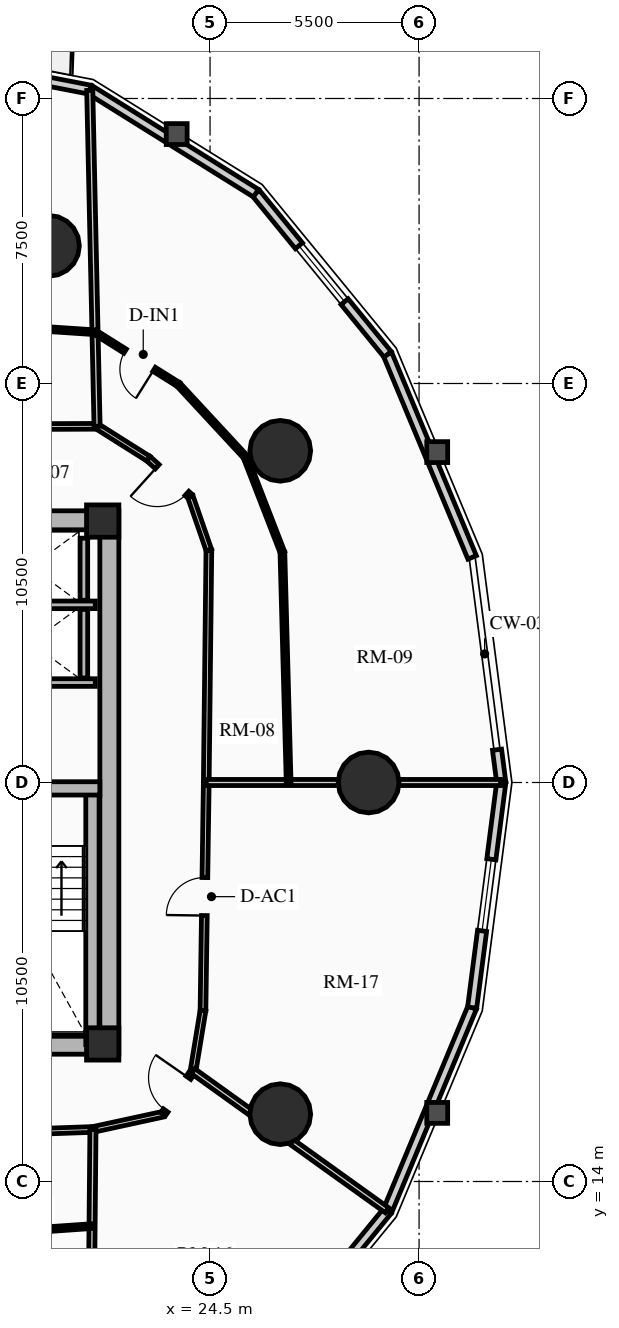
"""IFC4 building model, lengths in metres.
Left out: names, types, materials, properties, quantities, classifications, styles, units other than length and angle.
Written with IfcOpenShell. Run it as: python <this file> out.ifc"""

import sys

from ifc_helpers import new_model, si_unit, direction, frame, frame_2d, origin, origin_2d, place, context, subcontext, project, spatial, rectangle, circle, extrude, source, transform, mapped, element, fill, save


model = new_model("IFC4")
c1 = context("Model", 3, precision=1e-05, world=origin(), true_north=direction((0.0, 1.0)))
c2 = subcontext(c1, "Body", "Model", "MODEL_VIEW")
j1 = project(units=[si_unit("LENGTHUNIT", "METRE"), si_unit("PLANEANGLEUNIT", "RADIAN")], contexts=[c1])
p1 = place(None, origin())
s1 = spatial("IfcSite", under=j1, at=p1, CompositionType="ELEMENT")
p2 = place(p1, origin())
s2 = spatial("IfcBuilding", under=s1, at=p2, CompositionType="ELEMENT")
p3 = place(p2, frame((0.0, 0.0, 59.83)))
s3 = spatial("IfcBuildingStorey", under=s2, at=p3, CompositionType="ELEMENT", Elevation=59.83)
p4 = place(p3, frame((21.85, 17.35, 0.0), z_axis=(0.0, 0.0, 1.0), x_axis=(0.0, 1.0, 0.0)))
e1 = element("IfcWall", 1, at=p4, inside=s3, PredefinedType="SHEAR", context=c2, shape_type="SweptSolid", body=[
    extrude(rectangle(XDim=14.3, YDim=0.5, at=frame_2d((7.15, 0.0))), origin(), (0.0, 0.0, 1.0), 2.91),
])
p5 = place(p3, frame((11.15, 17.6, 0.0), z_axis=(0.0, 0.0, 1.0), x_axis=(1.0, 0.0, 0.0)))
e2 = element("IfcWall", 2, at=p5, inside=s3, PredefinedType="SHEAR", context=c2, shape_type="SweptSolid", body=[
    extrude(rectangle(XDim=10.7, YDim=0.5, at=frame_2d((5.35, 0.0))), origin(), (0.0, 0.0, 1.0), 2.91),
])
m1 = source(origin(), c2, "Body", "SweptSolid", [
    extrude(rectangle(XDim=1.5, YDim=2.02, at=frame_2d((0.75, 1.01))), frame((0.0, 0.26, 0.0), z_axis=(0.0, -1.0, 0.0), x_axis=(1.0, 0.0, 0.0)), (0.0, 0.0, 1.0), 0.52),
])
p6 = place(p5, frame((5.45, 0.0, 0.0)))
e3 = element("IfcOpeningElement", 3, at=p6, cuts=e2, PredefinedType="OPENING", context=c2, shape_type="MappedRepresentation", body=[
    mapped(m1, transform((0.0, 0.0, 0.0), x_axis=(1.0, 0.0, 0.0), y_axis=(0.0, 1.0, 0.0), z_axis=(0.0, 0.0, 1.0), scale=1.0)),
])
p7 = place(p3, frame((11.15, 31.4, 0.0), z_axis=(0.0, 0.0, 1.0), x_axis=(1.0, 0.0, 0.0)))
e4 = element("IfcWall", 4, at=p7, inside=s3, PredefinedType="SHEAR", context=c2, shape_type="SweptSolid", body=[
    extrude(rectangle(XDim=10.7, YDim=0.5, at=frame_2d((5.35, 0.0))), origin(), (0.0, 0.0, 1.0), 2.91),
])
p8 = place(p7, frame((4.6, 0.0, 0.0)))
e5 = element("IfcOpeningElement", 5, at=p8, cuts=e4, PredefinedType="OPENING", context=c2, shape_type="MappedRepresentation", body=[
    mapped(m1, transform((0.0, 0.0, 0.0), x_axis=(1.0, 0.0, 0.0), y_axis=(0.0, 1.0, 0.0), z_axis=(0.0, 0.0, 1.0), scale=1.0)),
])
p9 = place(p3, frame((21.405, 17.6, 0.0), z_axis=(0.0, 0.0, 1.0), x_axis=(0.0, 1.0, 0.0)))
e6 = element("IfcWall", 6, at=p9, inside=s3, PredefinedType="SHEAR", context=c2, shape_type="SweptSolid", body=[
    extrude(rectangle(XDim=6.745, YDim=0.35, at=frame_2d((3.373, 0.0))), origin(), (0.0, 0.0, 1.0), 2.91),
])
p10 = place(p3, frame((18.315, 24.345, 0.0), z_axis=(0.0, 0.0, 1.0), x_axis=(1.0, 0.0, 0.0)))
e7 = element("IfcWall", 7, at=p10, inside=s3, PredefinedType="SHEAR", context=c2, shape_type="SweptSolid", body=[
    extrude(rectangle(XDim=3.285, YDim=0.35, at=frame_2d((1.643, 0.0))), origin(), (0.0, 0.0, 1.0), 2.91),
])
for number, where, z_axis, x_axis in (
    (8, (21.675, 17.62, 0.0), (0.0, 0.0, 1.0), (1.0, 0.0, 0.0)),
    (9, (21.675, 31.38, 0.0), (0.0, 0.0, 1.0), (1.0, 0.0, 0.0)),
):
    element("IfcColumn", number, at=place(p3, frame(where, z_axis=z_axis, x_axis=x_axis)), inside=s3, PredefinedType="COLUMN", context=c2, shape_type="SweptSolid", body=[
        extrude(rectangle(XDim=0.85, YDim=0.85, at=origin_2d()), origin(), (0.0, 0.0, 1.0), 2.91),
    ])
for number, where, z_axis, x_axis in (
    (10, (28.672, 24.5, 0.0), (0.0, 0.0, 1.0), (1.0, 0.0, 0.0)),
    (11, (26.347, 33.229, 0.0), (0.0, 0.0, 1.0), (1.0, 0.0, 0.0)),
    (12, (20.261, 38.623, 0.0), (0.0, 0.0, 1.0), (1.0, 0.0, 0.0)),
    (13, (26.347, 15.771, 0.0), (0.0, 0.0, 1.0), (1.0, 0.0, 0.0)),
):
    element("IfcColumn", number, at=place(p3, frame(where, z_axis=z_axis, x_axis=x_axis)), inside=s3, PredefinedType="USERDEFINED", context=c2, shape_type="SweptSolid", body=[
        extrude(circle(Radius=0.8, at=origin_2d()), origin(), (0.0, 0.0, 1.0), 2.91),
    ])
p11 = place(p3, frame((32.051, 25.363, 0.0), z_axis=(0.0, 0.0, 1.0), x_axis=(0.128523364007, -0.991706481225, 0.0)))
e14 = element("IfcWall", 14, at=p11, inside=s3, PredefinedType="SOLIDWALL", context=c2, shape_type="SweptSolid", body=[
    extrude(rectangle(XDim=0.87, YDim=0.24, at=frame_2d((0.435, 0.0))), origin(), (0.0, 0.0, 1.0), 2.635),
])
p12 = place(p3, frame((29.172, 35.768, 0.0), z_axis=(0.0, 0.0, 1.0), x_axis=(0.384348836956, -0.923187939442, 0.0)))
e15 = element("IfcWall", 15, at=p12, inside=s3, PredefinedType="SOLIDWALL", context=c2, shape_type="SweptSolid", body=[
    extrude(rectangle(XDim=5.789, YDim=0.24, at=frame_2d((2.894, 0.0))), origin(), (0.0, 0.0, 1.0), 2.073),
])
p13 = place(p3, frame((25.707, 40.009, 0.0), z_axis=(0.0, 0.0, 1.0), x_axis=(0.632713287022, -0.77438614168, 0.0)))
e16 = element("IfcWall", 16, at=p13, inside=s3, PredefinedType="SOLIDWALL", context=c2, shape_type="SweptSolid", body=[
    extrude(rectangle(XDim=5.477, YDim=0.24, at=frame_2d((2.738, 0.0))), origin(), (0.0, 0.0, 1.0), 2.073),
])
m2 = source(origin(), c2, "Body", "SweptSolid", [
    extrude(rectangle(XDim=1.9, YDim=1.35, at=frame_2d((0.95, 0.675))), frame((0.0, 0.13, 0.0), z_axis=(0.0, -1.0, 0.0), x_axis=(1.0, 0.0, 0.0)), (0.0, 0.0, 1.0), 0.26),
])
p14 = place(p13, frame((1.788, 0.0, 0.65)))
e17 = element("IfcOpeningElement", 17, at=p14, cuts=e16, PredefinedType="OPENING", context=c2, shape_type="MappedRepresentation", body=[
    mapped(m2, transform((0.0, 0.0, 0.0), x_axis=(1.0, 0.0, 0.0), y_axis=(0.0, 1.0, 0.0), z_axis=(0.0, 0.0, 1.0), scale=1.0)),
])
p15 = place(p3, frame((21.34, 42.732, 0.0), z_axis=(0.0, 0.0, 1.0), x_axis=(0.848533613342, -0.529141481107, 0.0)))
e18 = element("IfcWall", 18, at=p15, inside=s3, PredefinedType="SOLIDWALL", context=c2, shape_type="SweptSolid", body=[
    extrude(rectangle(XDim=5.146, YDim=0.24, at=frame_2d((2.573, 0.0))), origin(), (0.0, 0.0, 1.0), 2.073),
])
p16 = place(p3, frame((16.5, 43.67, 0.0), z_axis=(0.0, 0.0, 1.0), x_axis=(0.981725274071, -0.190303668512, 0.0)))
e19 = element("IfcWall", 19, at=p16, inside=s3, PredefinedType="SOLIDWALL", context=c2, shape_type="SweptSolid", body=[
    extrude(rectangle(XDim=4.93, YDim=0.24, at=frame_2d((2.465, 0.0))), origin(), (0.0, 0.0, 1.0), 2.073),
])
m3 = source(origin(), c2, "Body", "SweptSolid", [
    extrude(rectangle(XDim=1.15, YDim=2.005, at=frame_2d((0.575, 1.002))), frame((0.0, 0.13, 0.0), z_axis=(0.0, -1.0, 0.0), x_axis=(1.0, 0.0, 0.0)), (0.0, 0.0, 1.0), 0.26),
])
p17 = place(p16, frame((1.89, 0.0, 0.0)))
e20 = element("IfcOpeningElement", 20, at=p17, cuts=e19, PredefinedType="OPENING", context=c2, shape_type="MappedRepresentation", body=[
    mapped(m3, transform((0.0, 0.0, 0.0), x_axis=(1.0, 0.0, 0.0), y_axis=(0.0, 1.0, 0.0), z_axis=(0.0, 0.0, 1.0), scale=1.0)),
])
p18 = place(p3, frame((29.172, 13.232, 0.0), z_axis=(0.0, 0.0, 1.0), x_axis=(-0.632713287022, -0.77438614168, 0.0)))
e21 = element("IfcWall", 21, at=p18, inside=s3, PredefinedType="SOLIDWALL", context=c2, shape_type="SweptSolid", body=[
    extrude(rectangle(XDim=5.477, YDim=0.24, at=frame_2d((2.738, 0.0))), origin(), (0.0, 0.0, 1.0), 2.073),
])
p19 = place(p18, frame((1.788, 0.0, 0.65)))
e22 = element("IfcOpeningElement", 22, at=p19, cuts=e21, PredefinedType="OPENING", context=c2, shape_type="MappedRepresentation", body=[
    mapped(m2, transform((0.0, 0.0, 0.0), x_axis=(1.0, 0.0, 0.0), y_axis=(0.0, 1.0, 0.0), z_axis=(0.0, 0.0, 1.0), scale=1.0)),
])
p20 = place(p3, frame((31.396, 18.576, 0.0), z_axis=(0.0, 0.0, 1.0), x_axis=(-0.384348836956, -0.923187939442, 0.0)))
e23 = element("IfcWall", 23, at=p20, inside=s3, PredefinedType="SOLIDWALL", context=c2, shape_type="SweptSolid", body=[
    extrude(rectangle(XDim=5.789, YDim=0.24, at=frame_2d((2.894, 0.0))), origin(), (0.0, 0.0, 1.0), 2.073),
])
p21 = place(p3, frame((32.163, 24.5, 0.0), z_axis=(0.0, 0.0, 1.0), x_axis=(-0.128339641463, -0.991730274031, 0.0)))
e24 = element("IfcWall", 24, at=p21, inside=s3, PredefinedType="SOLIDWALL", context=c2, shape_type="SweptSolid", body=[
    extrude(rectangle(XDim=5.973, YDim=0.24, at=frame_2d((2.987, 0.0))), origin(), (0.0, 0.0, 1.0), 2.073),
])
p22 = place(p21, frame((2.037, 0.0, 0.65)))
e25 = element("IfcOpeningElement", 25, at=p22, cuts=e24, PredefinedType="OPENING", context=c2, shape_type="MappedRepresentation", body=[
    mapped(m2, transform((0.0, 0.0, 0.0), x_axis=(1.0, 0.0, 0.0), y_axis=(0.0, 1.0, 0.0), z_axis=(0.0, 0.0, 1.0), scale=1.0)),
])
for number, where, z_axis, x_axis in (
    (26, (18.51, 27.13, 0.0), (0.0, 0.0, 1.0), (1.0, 0.0, 0.0)),
    (27, (18.51, 29.175, 0.0), (0.0, 0.0, 1.0), (1.0, 0.0, 0.0)),
):
    element("IfcWall", number, at=place(p3, frame(where, z_axis=z_axis, x_axis=x_axis)), inside=s3, PredefinedType="SHEAR", context=c2, shape_type="SweptSolid", body=[
        extrude(rectangle(XDim=2.97, YDim=0.2, at=frame_2d((1.485, 0.0))), origin(), (0.0, 0.0, 1.0), 2.91),
    ])
p23 = place(p3, frame((21.18, 27.25, 0.0), z_axis=(0.0, 0.0, 1.0), x_axis=(0.0, 1.0, 0.0)))
e28 = element("IfcWall", 28, at=p23, inside=s3, PredefinedType="SHEAR", context=c2, shape_type="SweptSolid", body=[
    extrude(rectangle(XDim=1.805, YDim=0.2, at=frame_2d((0.902, 0.0))), origin(), (0.0, 0.0, 1.0), 2.91),
])
p24 = place(p3, frame((21.18, 29.295, 0.0), z_axis=(0.0, 0.0, 1.0), x_axis=(0.0, 1.0, 0.0)))
e29 = element("IfcWall", 29, at=p24, inside=s3, PredefinedType="SHEAR", context=c2, shape_type="SweptSolid", body=[
    extrude(rectangle(XDim=1.635, YDim=0.2, at=frame_2d((0.817, 0.0))), origin(), (0.0, 0.0, 1.0), 2.91),
])
p25 = place(p3, frame((24.4, 24.5, 0.0), z_axis=(0.0, 0.0, 1.0), x_axis=(0.011299841544, 0.999936154752, 0.0)))
e30 = element("IfcWall", 30, at=p25, inside=s3, PredefinedType="PARTITIONING", context=c2, shape_type="SweptSolid", body=[
    extrude(rectangle(XDim=6.115, YDim=0.15, at=frame_2d((3.057, 0.0))), origin(), (0.0, 0.0, 1.0), 2.159),
])
p26 = place(p3, frame((24.469, 30.614, 0.0), z_axis=(0.0, 0.0, 1.0), x_axis=(-0.327228335485, 0.944945298129, 0.0)))
e31 = element("IfcWall", 31, at=p26, inside=s3, PredefinedType="PARTITIONING", context=c2, shape_type="SweptSolid", body=[
    extrude(rectangle(XDim=1.495, YDim=0.15, at=frame_2d((0.748, 0.0))), origin(), (0.0, 0.0, 1.0), 2.205),
])
p27 = place(p3, frame((23.98, 32.027, 0.0), z_axis=(0.0, 0.0, 1.0), x_axis=(-0.742353224332, 0.670008724065, 0.0)))
e32 = element("IfcWall", 32, at=p27, inside=s3, PredefinedType="PARTITIONING", context=c2, shape_type="SweptSolid", body=[
    extrude(rectangle(XDim=1.485, YDim=0.15, at=frame_2d((0.742, 0.0))), origin(), (0.0, 0.0, 1.0), 2.159),
])
m4 = source(origin(), c2, "Body", "SweptSolid", [
    extrude(rectangle(XDim=1.05, YDim=2.015, at=frame_2d((0.525, 1.007))), frame((0.0, 0.085, 0.0), z_axis=(0.0, -1.0, 0.0), x_axis=(1.0, 0.0, 0.0)), (0.0, 0.0, 1.0), 0.17),
])
p28 = place(p27, frame((0.12, 0.0, 0.0)))
e33 = element("IfcOpeningElement", 33, at=p28, cuts=e32, PredefinedType="OPENING", context=c2, shape_type="MappedRepresentation", body=[
    mapped(m4, transform((0.0, 0.0, 0.0), x_axis=(1.0, 0.0, 0.0), y_axis=(0.0, 1.0, 0.0), z_axis=(0.0, 0.0, 1.0), scale=1.0)),
])
p29 = place(p3, frame((22.877, 33.022, 0.0), z_axis=(0.0, 0.0, 1.0), x_axis=(-0.845895608855, 0.533348496689, 0.0)))
e34 = element("IfcWall", 34, at=p29, inside=s3, PredefinedType="PARTITIONING", context=c2, shape_type="SweptSolid", body=[
    extrude(rectangle(XDim=1.597, YDim=0.15, at=frame_2d((0.798, 0.0))), origin(), (0.0, 0.0, 1.0), 2.205),
])
p30 = place(p3, frame((21.527, 33.873, 0.0), z_axis=(0.0, 0.0, 1.0), x_axis=(-0.999991838845, -0.004040079574, 0.0)))
e35 = element("IfcWall", 35, at=p30, inside=s3, PredefinedType="PARTITIONING", context=c2, shape_type="SweptSolid", body=[
    extrude(rectangle(XDim=3.384, YDim=0.15, at=frame_2d((1.692, 0.0))), origin(), (0.0, 0.0, 1.0), 2.159),
])
p31 = place(p3, frame((14.781, 15.141, 0.0), z_axis=(0.0, 0.0, 1.0), x_axis=(0.999407918707, 0.034406569513, 0.0)))
e36 = element("IfcWall", 36, at=p31, inside=s3, PredefinedType="PARTITIONING", context=c2, shape_type="SweptSolid", body=[
    extrude(rectangle(XDim=6.642, YDim=0.15, at=frame_2d((3.321, 0.0))), origin(), (0.0, 0.0, 1.0), 2.159),
])
p32 = place(p3, frame((21.419, 15.369, 0.0), z_axis=(0.0, 0.0, 1.0), x_axis=(0.977192701953, 0.212354475464, 0.0)))
e37 = element("IfcWall", 37, at=p32, inside=s3, PredefinedType="PARTITIONING", context=c2, shape_type="SweptSolid", body=[
    extrude(rectangle(XDim=1.888, YDim=0.15, at=frame_2d((0.944, 0.0))), origin(), (0.0, 0.0, 1.0), 2.205),
])
p33 = place(p3, frame((23.263, 15.77, 0.0), z_axis=(0.0, 0.0, 1.0), x_axis=(0.570743456919, 0.821128434768, 0.0)))
e38 = element("IfcWall", 38, at=p33, inside=s3, PredefinedType="PARTITIONING", context=c2, shape_type="SweptSolid", body=[
    extrude(rectangle(XDim=1.382, YDim=0.15, at=frame_2d((0.691, 0.0))), origin(), (0.0, 0.0, 1.0), 2.159),
])
p34 = place(p33, frame((0.12, 0.0, 0.0)))
e39 = element("IfcOpeningElement", 39, at=p34, cuts=e38, PredefinedType="OPENING", context=c2, shape_type="MappedRepresentation", body=[
    mapped(m4, transform((0.0, 0.0, 0.0), x_axis=(1.0, 0.0, 0.0), y_axis=(0.0, 1.0, 0.0), z_axis=(0.0, 0.0, 1.0), scale=1.0)),
])
p35 = place(p3, frame((24.052, 16.905, 0.0), z_axis=(0.0, 0.0, 1.0), x_axis=(0.162091534225, 0.986775726562, 0.0)))
e40 = element("IfcWall", 40, at=p35, inside=s3, PredefinedType="PARTITIONING", context=c2, shape_type="SweptSolid", body=[
    extrude(rectangle(XDim=1.613, YDim=0.15, at=frame_2d((0.807, 0.0))), origin(), (0.0, 0.0, 1.0), 2.205),
])
p36 = place(p3, frame((24.313, 18.496, 0.0), z_axis=(0.0, 0.0, 1.0), x_axis=(0.014394019188, 0.999896400739, 0.0)))
e41 = element("IfcWall", 41, at=p36, inside=s3, PredefinedType="PARTITIONING", context=c2, shape_type="SweptSolid", body=[
    extrude(rectangle(XDim=6.004, YDim=0.15, at=frame_2d((3.002, 0.0))), origin(), (0.0, 0.0, 1.0), 2.635),
])
m5 = source(origin(), c2, "Body", "SweptSolid", [
    extrude(rectangle(XDim=1.0, YDim=2.015, at=frame_2d((0.5, 1.007))), frame((0.0, 0.085, 0.0), z_axis=(0.0, -1.0, 0.0), x_axis=(1.0, 0.0, 0.0)), (0.0, 0.0, 1.0), 0.17),
])
p37 = place(p36, frame((2.502, 0.0, 0.0)))
e42 = element("IfcOpeningElement", 42, at=p37, cuts=e41, PredefinedType="OPENING", context=c2, shape_type="MappedRepresentation", body=[
    mapped(m5, transform((0.0, 0.0, 0.0), x_axis=(1.0, 0.0, 0.0), y_axis=(0.0, 1.0, 0.0), z_axis=(0.0, 0.0, 1.0), scale=1.0)),
])
p38 = place(p3, frame((24.4, 24.5, 0.0), z_axis=(0.0, 0.0, 1.0), x_axis=(1.0, 0.0, 0.0)))
e43 = element("IfcWall", 43, at=p38, inside=s3, PredefinedType="PARTITIONING", context=c2, shape_type="SweptSolid", body=[
    extrude(rectangle(XDim=7.743, YDim=0.16, at=frame_2d((3.872, 0.0))), origin(), (0.0, 0.0, 1.0), 2.073),
])
p39 = place(p3, frame((21.527, 33.873, 0.0), z_axis=(0.0, 0.0, 1.0), x_axis=(-0.021814395676, 0.999762037758, 0.0)))
e44 = element("IfcWall", 44, at=p39, inside=s3, PredefinedType="PARTITIONING", context=c2, shape_type="SweptSolid", body=[
    extrude(rectangle(XDim=8.842, YDim=0.16, at=frame_2d((4.421, 0.0))), origin(), (0.0, 0.0, 1.0), 2.073),
])
p40 = place(p3, frame((21.419, 15.369, 0.0), z_axis=(0.0, 0.0, 1.0), x_axis=(-0.009327801925, -0.999956495109, 0.0)))
e45 = element("IfcWall", 45, at=p40, inside=s3, PredefinedType="PARTITIONING", context=c2, shape_type="SweptSolid", body=[
    extrude(rectangle(XDim=9.082, YDim=0.16, at=frame_2d((4.541, 0.0))), origin(), (0.0, 0.0, 1.0), 2.073),
])
p41 = place(p3, frame((24.052, 16.905, 0.0), z_axis=(0.0, 0.0, 1.0), x_axis=(0.812581474608, -0.582847619129, 0.0)))
e46 = element("IfcWall", 46, at=p41, inside=s3, PredefinedType="PARTITIONING", context=c2, shape_type="SweptSolid", body=[
    extrude(rectangle(XDim=6.281, YDim=0.16, at=frame_2d((3.14, 0.0))), origin(), (0.0, 0.0, 1.0), 2.073),
])
p42 = place(p3, frame((26.568, 24.5, 0.0), z_axis=(0.0, 0.0, 1.0), x_axis=(-0.027187947422, 0.999630339433, 0.0)))
e47 = element("IfcWall", 47, at=p42, inside=s3, PredefinedType="PARTITIONING", context=c2, shape_type="SweptSolid", body=[
    extrude(rectangle(XDim=6.061, YDim=0.125, at=frame_2d((3.031, 0.0))), origin(), (0.0, 0.0, 1.0), 2.159),
])
p43 = place(p3, frame((26.403, 30.559, 0.0), z_axis=(0.0, 0.0, 1.0), x_axis=(-0.361637165216, 0.932318915787, 0.0)))
e48 = element("IfcWall", 48, at=p43, inside=s3, PredefinedType="PARTITIONING", context=c2, shape_type="SweptSolid", body=[
    extrude(rectangle(XDim=2.694, YDim=0.125, at=frame_2d((1.347, 0.0))), origin(), (0.0, 0.0, 1.0), 2.159),
])
p44 = place(p3, frame((25.429, 33.071, 0.0), z_axis=(0.0, 0.0, 1.0), x_axis=(-0.679623863187, 0.733560770889, 0.0)))
e49 = element("IfcWall", 49, at=p44, inside=s3, PredefinedType="PARTITIONING", context=c2, shape_type="SweptSolid", body=[
    extrude(rectangle(XDim=2.594, YDim=0.125, at=frame_2d((1.297, 0.0))), origin(), (0.0, 0.0, 1.0), 2.635),
])
p45 = place(p3, frame((23.666, 34.974, 0.0), z_axis=(0.0, 0.0, 1.0), x_axis=(-0.847319394731, 0.531083650014, 0.0)))
e50 = element("IfcWall", 50, at=p45, inside=s3, PredefinedType="PARTITIONING", context=c2, shape_type="SweptSolid", body=[
    extrude(rectangle(XDim=2.589, YDim=0.125, at=frame_2d((1.294, 0.0))), origin(), (0.0, 0.0, 1.0), 2.205),
])
m6 = source(origin(), c2, "Body", "SweptSolid", [
    extrude(rectangle(XDim=0.9, YDim=2.005, at=frame_2d((0.45, 1.002))), frame((0.0, 0.073, 0.0), z_axis=(0.0, -1.0, 0.0), x_axis=(1.0, 0.0, 0.0)), (0.0, 0.0, 1.0), 0.145),
])
p46 = place(p45, frame((0.754, 0.0, 0.0)))
e51 = element("IfcOpeningElement", 51, at=p46, cuts=e50, PredefinedType="OPENING", context=c2, shape_type="MappedRepresentation", body=[
    mapped(m6, transform((0.0, 0.0, 0.0), x_axis=(1.0, 0.0, 0.0), y_axis=(0.0, 1.0, 0.0), z_axis=(0.0, 0.0, 1.0), scale=1.0)),
])
p47 = place(p3, frame((21.473, 36.348, 0.0), z_axis=(0.0, 0.0, 1.0), x_axis=(-0.997789137643, 0.066459286803, 0.0)))
e52 = element("IfcWall", 52, at=p47, inside=s3, PredefinedType="PARTITIONING", context=c2, shape_type="SweptSolid", body=[
    extrude(rectangle(XDim=3.798, YDim=0.125, at=frame_2d((1.899, 0.0))), origin(), (0.0, 0.0, 1.0), 2.159),
])
p48 = place(p3, frame((15.262, 12.399, 0.0), z_axis=(0.0, 0.0, 1.0), x_axis=(0.997584901562, 0.069457643027, 0.0)))
e53 = element("IfcWall", 53, at=p48, inside=s3, PredefinedType="PARTITIONING", context=c2, shape_type="SweptSolid", body=[
    extrude(rectangle(XDim=6.148, YDim=0.125, at=frame_2d((3.074, 0.0))), origin(), (0.0, 0.0, 1.0), 2.159),
])
p49 = place(p48, frame((1.372, 0.0, 0.0)))
e54 = element("IfcOpeningElement", 54, at=p49, cuts=e53, PredefinedType="OPENING", context=c2, shape_type="MappedRepresentation", body=[
    mapped(m6, transform((0.0, 0.0, 0.0), x_axis=(1.0, 0.0, 0.0), y_axis=(0.0, 1.0, 0.0), z_axis=(0.0, 0.0, 1.0), scale=1.0)),
])
m7 = source(origin(), c2, "Body", "SweptSolid", [
    extrude(rectangle(XDim=1.9, YDim=1.35, at=frame_2d((0.95, 0.675))), frame((0.0, 0.03, 0.0), z_axis=(0.0, -1.0, 0.0), x_axis=(1.0, 0.0, 0.0)), (0.0, 0.0, 1.0), 0.06),
])
p50 = place(p14, origin())
e55 = element("IfcWindow", 55, at=p50, inside=s3, PartitioningType="DOUBLE_PANEL_VERTICAL", PredefinedType="WINDOW", context=c2, shape_type="MappedRepresentation", body=[
    mapped(m7, transform((0.0, 0.0, 0.0), x_axis=(1.0, 0.0, 0.0), y_axis=(0.0, 1.0, 0.0), z_axis=(0.0, 0.0, 1.0), scale=1.0)),
])
fill(e17, e55)
p51 = place(p22, origin())
e56 = element("IfcWindow", 56, at=p51, inside=s3, PartitioningType="DOUBLE_PANEL_VERTICAL", PredefinedType="WINDOW", context=c2, shape_type="MappedRepresentation", body=[
    mapped(m7, transform((0.0, 0.0, 0.0), x_axis=(1.0, 0.0, 0.0), y_axis=(0.0, 1.0, 0.0), z_axis=(0.0, 0.0, 1.0), scale=1.0)),
])
fill(e25, e56)
m8 = source(origin(), c2, "Body", "SweptSolid", [
    extrude(rectangle(XDim=1.05, YDim=2.015, at=frame_2d((0.525, 1.007))), frame((0.0, 0.025, 0.0), z_axis=(0.0, -1.0, 0.0), x_axis=(1.0, 0.0, 0.0)), (0.0, 0.0, 1.0), 0.05),
])
p52 = place(p28, origin())
e57 = element("IfcDoor", 57, at=p52, inside=s3, OperationType="SINGLE_SWING_RIGHT", PredefinedType="DOOR", context=c2, shape_type="MappedRepresentation", body=[
    mapped(m8, transform((0.0, 0.0, 0.0), x_axis=(1.0, 0.0, 0.0), y_axis=(0.0, 1.0, 0.0), z_axis=(0.0, 0.0, 1.0), scale=1.0)),
])
fill(e33, e57)
m9 = source(origin(), c2, "Body", "SweptSolid", [
    extrude(rectangle(XDim=0.9, YDim=2.005, at=frame_2d((0.45, 1.002))), frame((0.0, 0.025, 0.0), z_axis=(0.0, -1.0, 0.0), x_axis=(1.0, 0.0, 0.0)), (0.0, 0.0, 1.0), 0.05),
])
p53 = place(p46, origin())
e58 = element("IfcDoor", 58, at=p53, inside=s3, OperationType="SINGLE_SWING_LEFT", PredefinedType="DOOR", context=c2, shape_type="MappedRepresentation", body=[
    mapped(m9, transform((0.0, 0.0, 0.0), x_axis=(1.0, 0.0, 0.0), y_axis=(0.0, 1.0, 0.0), z_axis=(0.0, 0.0, 1.0), scale=1.0)),
])
fill(e51, e58)
p54 = place(p34, origin())
e59 = element("IfcDoor", 59, at=p54, inside=s3, OperationType="SINGLE_SWING_RIGHT", PredefinedType="DOOR", context=c2, shape_type="MappedRepresentation", body=[
    mapped(m8, transform((0.0, 0.0, 0.0), x_axis=(1.0, 0.0, 0.0), y_axis=(0.0, 1.0, 0.0), z_axis=(0.0, 0.0, 1.0), scale=1.0)),
])
fill(e39, e59)
m10 = source(origin(), c2, "Body", "SweptSolid", [
    extrude(rectangle(XDim=1.0, YDim=2.015, at=frame_2d((0.5, 1.007))), frame((0.0, 0.025, 0.0), z_axis=(0.0, -1.0, 0.0), x_axis=(1.0, 0.0, 0.0)), (0.0, 0.0, 1.0), 0.05),
])
p55 = place(p37, origin())
e60 = element("IfcDoor", 60, at=p55, inside=s3, OperationType="SINGLE_SWING_LEFT", PredefinedType="DOOR", context=c2, shape_type="MappedRepresentation", body=[
    mapped(m10, transform((0.0, 0.0, 0.0), x_axis=(1.0, 0.0, 0.0), y_axis=(0.0, 1.0, 0.0), z_axis=(0.0, 0.0, 1.0), scale=1.0)),
])
fill(e42, e60)
save(model, sys.argv[1])
